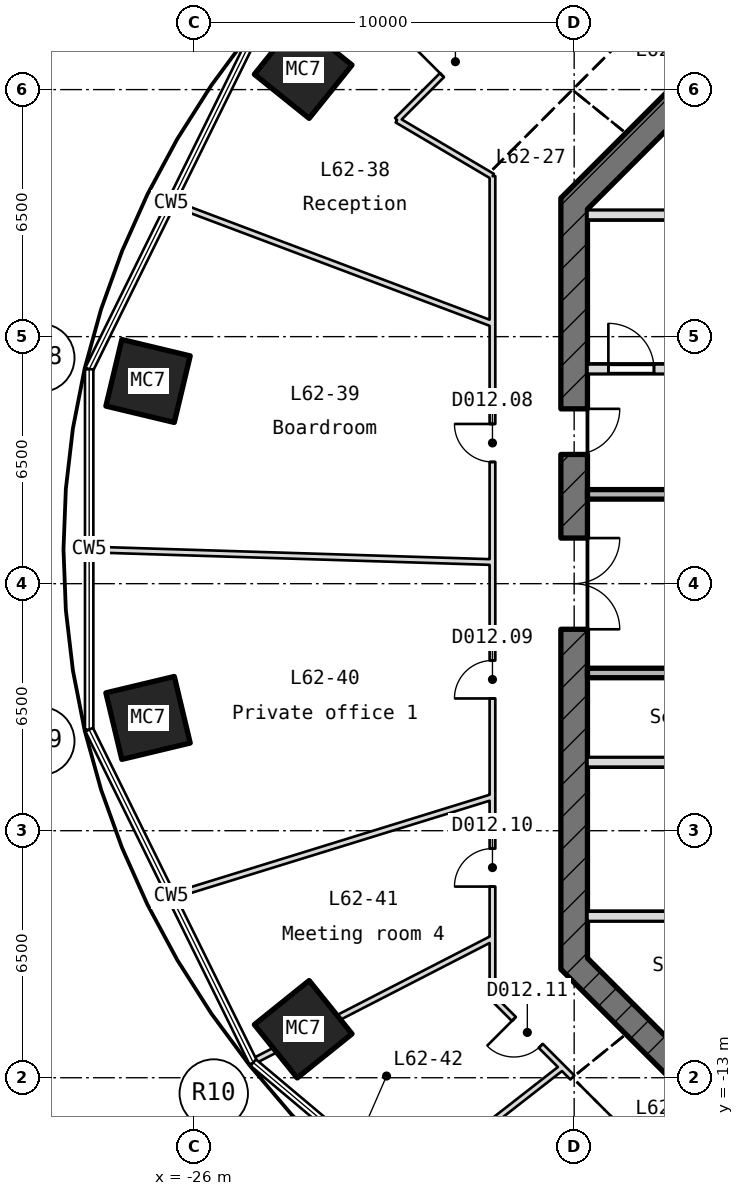
"""IFC4 building model, lengths in metres.
Left out: names, types, materials, properties, quantities, classifications, styles, units other than length and angle.
Written with IfcOpenShell. Run it as: python <this file> out.ifc"""

import sys

from ifc_helpers import new_model, si_unit, direction, frame, frame_2d, origin, origin_2d, place, context, subcontext, project, spatial, rectangle, hollow_rectangle, extrude, element, fill, save


model = new_model("IFC4")
c1 = context("Model", 3, precision=1e-05, world=origin(), true_north=direction((0.0, 1.0)))
c2 = subcontext(c1, "Body", "Model", "MODEL_VIEW")
j1 = project(units=[si_unit("LENGTHUNIT", "METRE"), si_unit("PLANEANGLEUNIT", "RADIAN")], contexts=[c1])
p1 = place(None, origin())
s1 = spatial("IfcSite", under=j1, at=p1, CompositionType="ELEMENT")
p2 = place(p1, origin())
s2 = spatial("IfcBuilding", under=s1, at=p2, CompositionType="ELEMENT")
p3 = place(p2, frame((0.0, 0.0, 279.1)))
s3 = spatial("IfcBuildingStorey", under=s2, at=p3, CompositionType="ELEMENT", Elevation=279.1)
for number, where, z_axis, x_axis in (
    (1, (-23.131, 13.524, -0.25), (0.0, 0.0, 1.0), (0.627, 0.779, 0.0)),
    (2, (-27.213, 5.333, -0.25), (0.0, 0.0, 1.0), (0.233, 0.973, 0.0)),
    (3, (-27.213, -3.533, -0.25), (0.0, 0.0, 1.0), (-0.233, 0.973, 0.0)),
    (4, (-23.131, -11.724, -0.25), (0.0, 0.0, 1.0), (-0.627, 0.779, 0.0)),
):
    element("IfcColumn", number, at=place(p3, frame(where, z_axis=z_axis, x_axis=x_axis)), inside=s3, PredefinedType="COLUMN", context=c2, shape_type="SweptSolid", body=[
        extrude(hollow_rectangle(XDim=1.8, YDim=1.85, WallThickness=0.06, at=origin_2d()), origin(), (0.0, 0.0, 1.0), 5.47),
    ])
p4 = place(p3, frame((-12.897, 13.103, -0.25), z_axis=(0.0, 0.0, 1.0), x_axis=(-0.707106781187, -0.707106781187, 0.0)))
e5 = element("IfcWall", 5, at=p4, inside=s3, PredefinedType="SHEAR", context=c2, shape_type="SweptSolid", body=[
    extrude(rectangle(XDim=4.533, YDim=0.7, at=frame_2d((2.266, 0.0))), origin(), (0.0, 0.0, 1.0), 5.47),
])
p5 = place(p3, frame((-16.0, 10.145, -0.25), z_axis=(0.0, 0.0, 1.0), x_axis=(0.0, -1.0, 0.0)))
e6 = element("IfcWall", 6, at=p5, inside=s3, PredefinedType="SHEAR", context=c2, shape_type="SweptSolid", body=[
    extrude(rectangle(XDim=20.29, YDim=0.7, at=frame_2d((10.145, 0.0))), origin(), (0.0, 0.0, 1.0), 5.47),
])
p6 = place(p5, frame((8.945, 0.0, 0.25)))
e7 = element("IfcOpeningElement", 7, at=p6, cuts=e6, PredefinedType="OPENING", context=c2, shape_type="SweptSolid", body=[
    extrude(rectangle(XDim=2.4, YDim=2.1, at=frame_2d((1.2, 1.05))), frame((0.0, 0.36, 0.0), z_axis=(0.0, -1.0, 0.0), x_axis=(1.0, 0.0, 0.0)), (0.0, 0.0, 1.0), 0.72),
])
p7 = place(p5, frame((5.545, 0.0, 0.25)))
e8 = element("IfcOpeningElement", 8, at=p7, cuts=e6, PredefinedType="OPENING", context=c2, shape_type="SweptSolid", body=[
    extrude(rectangle(XDim=1.2, YDim=2.1, at=frame_2d((0.6, 1.05))), frame((0.0, 0.36, 0.0), z_axis=(0.0, -1.0, 0.0), x_axis=(1.0, 0.0, 0.0)), (0.0, 0.0, 1.0), 0.72),
])
p8 = place(p3, frame((-16.103, -9.897, -0.25), z_axis=(0.0, 0.0, 1.0), x_axis=(0.707106781187, -0.707106781187, 0.0)))
e9 = element("IfcWall", 9, at=p8, inside=s3, PredefinedType="SHEAR", context=c2, shape_type="SweptSolid", body=[
    extrude(rectangle(XDim=4.533, YDim=0.7, at=frame_2d((2.266, 0.0))), origin(), (0.0, 0.0, 1.0), 5.47),
])
p9 = place(p3, frame((-15.65, -8.75, -0.25), z_axis=(0.0, 0.0, 1.0), x_axis=(1.0, 0.0, 0.0)))
e10 = element("IfcWall", 10, at=p9, inside=s3, PredefinedType="SHEAR", context=c2, shape_type="SweptSolid", body=[
    extrude(rectangle(XDim=7.1, YDim=0.25, at=frame_2d((3.55, 0.0))), origin(), (0.0, 0.0, 1.0), 5.47),
])
p10 = place(p9, frame((5.6, 0.0, 0.25)))
e11 = element("IfcOpeningElement", 11, at=p10, cuts=e10, PredefinedType="OPENING", context=c2, shape_type="SweptSolid", body=[
    extrude(rectangle(XDim=1.2, YDim=2.1, at=frame_2d((0.6, 1.05))), frame((0.0, 0.135, 0.0), z_axis=(0.0, -1.0, 0.0), x_axis=(1.0, 0.0, 0.0)), (0.0, 0.0, 1.0), 0.27),
])
p11 = place(p3, frame((-15.65, -4.7, -0.25), z_axis=(0.0, 0.0, 1.0), x_axis=(1.0, 0.0, 0.0)))
e12 = element("IfcWall", 12, at=p11, inside=s3, PredefinedType="SHEAR", context=c2, shape_type="SweptSolid", body=[
    extrude(rectangle(XDim=7.1, YDim=0.25, at=frame_2d((3.55, 0.0))), origin(), (0.0, 0.0, 1.0), 5.47),
])
for number, where, z_axis, x_axis in (
    (13, (-15.65, -2.35, 0.0), (0.0, 0.0, 1.0), (1.0, 0.0, 0.0)),
    (14, (-15.65, 2.35, 0.0), (0.0, 0.0, 1.0), (1.0, 0.0, 0.0)),
):
    element("IfcWall", number, at=place(p3, frame(where, z_axis=z_axis, x_axis=x_axis)), inside=s3, PredefinedType="STANDARD", context=c2, shape_type="SweptSolid", body=[
        extrude(rectangle(XDim=7.25, YDim=0.25, at=frame_2d((3.625, 0.0))), origin(), (0.0, 0.0, 1.0), 5.22),
    ])
p12 = place(p3, frame((-15.65, 5.65, -0.25), z_axis=(0.0, 0.0, 1.0), x_axis=(1.0, 0.0, 0.0)))
e15 = element("IfcWall", 15, at=p12, inside=s3, PredefinedType="SHEAR", context=c2, shape_type="SweptSolid", body=[
    extrude(rectangle(XDim=7.1, YDim=0.25, at=frame_2d((3.55, 0.0))), origin(), (0.0, 0.0, 1.0), 5.47),
])
p13 = place(p12, frame((0.55, 0.0, 0.25)))
e16 = element("IfcOpeningElement", 16, at=p13, cuts=e15, PredefinedType="OPENING", context=c2, shape_type="SweptSolid", body=[
    extrude(rectangle(XDim=1.2, YDim=2.1, at=frame_2d((0.6, 1.05))), frame((0.0, 0.135, 0.0), z_axis=(0.0, -1.0, 0.0), x_axis=(1.0, 0.0, 0.0)), (0.0, 0.0, 1.0), 0.27),
])
p14 = place(p3, frame((-15.65, 9.7, -0.25), z_axis=(0.0, 0.0, 1.0), x_axis=(1.0, 0.0, 0.0)))
e17 = element("IfcWall", 17, at=p14, inside=s3, PredefinedType="SHEAR", context=c2, shape_type="SweptSolid", body=[
    extrude(rectangle(XDim=7.1, YDim=0.25, at=frame_2d((3.55, 0.0))), origin(), (0.0, 0.0, 1.0), 5.47),
])
p15 = place(p3, frame((-26.584, -8.216, 0.0), z_axis=(0.0, 0.0, 1.0), x_axis=(0.955409308592, 0.29528469831, 0.0)))
e18 = element("IfcWall", 18, at=p15, inside=s3, PredefinedType="PARTITIONING", context=c2, shape_type="SweptSolid", body=[
    extrude(rectangle(XDim=8.828, YDim=0.15, at=frame_2d((4.414, 0.0))), origin(), (0.0, 0.0, 1.0), 5.22),
])
p16 = place(p3, frame((-24.44, -12.566, 0.0), z_axis=(0.0, 0.0, 1.0), x_axis=(0.889344754937, 0.45723725446, 0.0)))
e19 = element("IfcWall", 19, at=p16, inside=s3, PredefinedType="PARTITIONING", context=c2, shape_type="SweptSolid", body=[
    extrude(rectangle(XDim=7.073, YDim=0.15, at=frame_2d((3.536, 0.0))), origin(), (0.0, 0.0, 1.0), 5.22),
])
p17 = place(p3, frame((-18.46, -14.399, 0.0), z_axis=(0.0, 0.0, 1.0), x_axis=(0.788462265821, 0.615083128834, 0.0)))
e20 = element("IfcWall", 20, at=p17, inside=s3, PredefinedType="PARTITIONING", context=c2, shape_type="SweptSolid", body=[
    extrude(rectangle(XDim=2.72, YDim=0.15, at=frame_2d((1.36, 0.0))), origin(), (0.0, 0.0, 1.0), 5.22),
])
p18 = place(p3, frame((-20.659, 12.2, 0.0), z_axis=(0.0, 0.0, 1.0), x_axis=(0.707091504448, 0.707122057596, 0.0)))
e21 = element("IfcWall", 21, at=p18, inside=s3, PredefinedType="PARTITIONING", context=c2, shape_type="SweptSolid", body=[
    extrude(rectangle(XDim=7.991, YDim=0.15, at=frame_2d((3.995, 0.0))), origin(), (0.0, 0.0, 1.0), 5.22),
])
p19 = place(p18, frame((1.67, 0.0, 0.0)))
e22 = element("IfcOpeningElement", 22, at=p19, cuts=e21, PredefinedType="OPENING", context=c2, shape_type="SweptSolid", body=[
    extrude(rectangle(XDim=1.0, YDim=2.1, at=frame_2d((0.5, 1.05))), frame((0.0, 0.085, 0.0), z_axis=(0.0, -1.0, 0.0), x_axis=(1.0, 0.0, 0.0)), (0.0, 0.0, 1.0), 0.17),
])
p20 = place(p3, frame((-18.15, -10.891, 0.0), z_axis=(0.0, 0.0, 1.0), x_axis=(0.0, 1.0, 0.0)))
e23 = element("IfcWall", 23, at=p20, inside=s3, PredefinedType="PARTITIONING", context=c2, shape_type="SweptSolid", body=[
    extrude(rectangle(XDim=21.614, YDim=0.15, at=frame_2d((10.807, 0.0))), origin(), (0.0, 0.0, 1.0), 5.22),
])
p21 = place(p20, frame((14.093, 0.0, 0.0)))
e24 = element("IfcOpeningElement", 24, at=p21, cuts=e23, PredefinedType="OPENING", context=c2, shape_type="SweptSolid", body=[
    extrude(rectangle(XDim=1.0, YDim=2.1, at=frame_2d((0.5, 1.05))), frame((0.0, 0.085, 0.0), z_axis=(0.0, -1.0, 0.0), x_axis=(1.0, 0.0, 0.0)), (0.0, 0.0, 1.0), 0.17),
])
p22 = place(p20, frame((7.87, 0.0, 0.0)))
e25 = element("IfcOpeningElement", 25, at=p22, cuts=e23, PredefinedType="OPENING", context=c2, shape_type="SweptSolid", body=[
    extrude(rectangle(XDim=1.0, YDim=2.1, at=frame_2d((0.5, 1.05))), frame((0.0, 0.085, 0.0), z_axis=(0.0, -1.0, 0.0), x_axis=(1.0, 0.0, 0.0)), (0.0, 0.0, 1.0), 0.17),
])
p23 = place(p20, frame((2.92, 0.0, 0.0)))
e26 = element("IfcOpeningElement", 26, at=p23, cuts=e23, PredefinedType="OPENING", context=c2, shape_type="SweptSolid", body=[
    extrude(rectangle(XDim=1.0, YDim=2.1, at=frame_2d((0.5, 1.05))), frame((0.0, 0.085, 0.0), z_axis=(0.0, -1.0, 0.0), x_axis=(1.0, 0.0, 0.0)), (0.0, 0.0, 1.0), 0.17),
])
p24 = place(p3, frame((-16.046, -12.994, 0.0), z_axis=(0.0, 0.0, 1.0), x_axis=(-0.707106781187, 0.707106781187, 0.0)))
e27 = element("IfcWall", 27, at=p24, inside=s3, PredefinedType="PARTITIONING", context=c2, shape_type="SweptSolid", body=[
    extrude(rectangle(XDim=2.975, YDim=0.15, at=frame_2d((1.487, 0.0))), origin(), (0.0, 0.0, 1.0), 5.22),
])
p25 = place(p24, frame((1.177, 0.0, 0.0)))
e28 = element("IfcOpeningElement", 28, at=p25, cuts=e27, PredefinedType="OPENING", context=c2, shape_type="SweptSolid", body=[
    extrude(rectangle(XDim=1.0, YDim=2.1, at=frame_2d((0.5, 1.05))), frame((0.0, 0.085, 0.0), z_axis=(0.0, -1.0, 0.0), x_axis=(1.0, 0.0, 0.0)), (0.0, 0.0, 1.0), 0.17),
])
p26 = place(p3, frame((-18.15, 10.718, 0.0), z_axis=(0.0, 0.0, 1.0), x_axis=(-0.861086603375, 0.508458318339, 0.0)))
e29 = element("IfcWall", 29, at=p26, inside=s3, PredefinedType="PARTITIONING", context=c2, shape_type="SweptSolid", body=[
    extrude(rectangle(XDim=2.914, YDim=0.15, at=frame_2d((1.457, 0.0))), origin(), (0.0, 0.0, 1.0), 5.22),
])
p27 = place(p3, frame((-18.15, 6.837, 0.0), z_axis=(0.0, 0.0, 1.0), x_axis=(-0.935798247138, 0.352536013271, 0.0)))
e30 = element("IfcWall", 30, at=p27, inside=s3, PredefinedType="PARTITIONING", context=c2, shape_type="SweptSolid", body=[
    extrude(rectangle(XDim=9.013, YDim=0.15, at=frame_2d((4.507, 0.0))), origin(), (0.0, 0.0, 1.0), 5.22),
])
p28 = place(p3, frame((-18.15, 0.568, 0.0), z_axis=(0.0, 0.0, 1.0), x_axis=(-0.999510501518, 0.031285097982, 0.0)))
e31 = element("IfcWall", 31, at=p28, inside=s3, PredefinedType="PARTITIONING", context=c2, shape_type="SweptSolid", body=[
    extrude(rectangle(XDim=10.597, YDim=0.15, at=frame_2d((5.299, 0.0))), origin(), (0.0, 0.0, 1.0), 5.22),
])
p29 = place(p13, origin())
e32 = element("IfcDoor", 32, at=p29, inside=s3, OperationType="SINGLE_SWING_RIGHT", PredefinedType="DOOR", context=c2, shape_type="SweptSolid", body=[
    extrude(rectangle(XDim=1.2, YDim=2.1, at=frame_2d((0.6, 1.05))), frame((0.0, 0.025, 0.0), z_axis=(0.0, -1.0, 0.0), x_axis=(1.0, 0.0, 0.0)), (0.0, 0.0, 1.0), 0.05),
])
fill(e16, e32)
p30 = place(p6, origin())
e33 = element("IfcDoor", 33, at=p30, inside=s3, OperationType="DOUBLE_DOOR_SINGLE_SWING", PredefinedType="DOOR", context=c2, shape_type="SweptSolid", body=[
    extrude(rectangle(XDim=2.4, YDim=2.1, at=frame_2d((1.2, 1.05))), frame((0.0, 0.025, 0.0), z_axis=(0.0, -1.0, 0.0), x_axis=(1.0, 0.0, 0.0)), (0.0, 0.0, 1.0), 0.05),
])
fill(e7, e33)
p31 = place(p7, origin())
e34 = element("IfcDoor", 34, at=p31, inside=s3, OperationType="SINGLE_SWING_RIGHT", PredefinedType="DOOR", context=c2, shape_type="SweptSolid", body=[
    extrude(rectangle(XDim=1.2, YDim=2.1, at=frame_2d((0.6, 1.05))), frame((0.0, 0.025, 0.0), z_axis=(0.0, -1.0, 0.0), x_axis=(1.0, 0.0, 0.0)), (0.0, 0.0, 1.0), 0.05),
])
fill(e8, e34)
p32 = place(p19, origin())
e35 = element("IfcDoor", 35, at=p32, inside=s3, OperationType="SINGLE_SWING_RIGHT", PredefinedType="DOOR", context=c2, shape_type="SweptSolid", body=[
    extrude(rectangle(XDim=1.0, YDim=2.1, at=frame_2d((0.5, 1.05))), frame((0.0, 0.025, 0.0), z_axis=(0.0, -1.0, 0.0), x_axis=(1.0, 0.0, 0.0)), (0.0, 0.0, 1.0), 0.05),
])
fill(e22, e35)
p33 = place(p21, origin())
e36 = element("IfcDoor", 36, at=p33, inside=s3, OperationType="SINGLE_SWING_RIGHT", PredefinedType="DOOR", context=c2, shape_type="SweptSolid", body=[
    extrude(rectangle(XDim=1.0, YDim=2.1, at=frame_2d((0.5, 1.05))), frame((0.0, 0.025, 0.0), z_axis=(0.0, -1.0, 0.0), x_axis=(1.0, 0.0, 0.0)), (0.0, 0.0, 1.0), 0.05),
])
fill(e24, e36)
p34 = place(p22, origin())
e37 = element("IfcDoor", 37, at=p34, inside=s3, OperationType="SINGLE_SWING_RIGHT", PredefinedType="DOOR", context=c2, shape_type="SweptSolid", body=[
    extrude(rectangle(XDim=1.0, YDim=2.1, at=frame_2d((0.5, 1.05))), frame((0.0, 0.025, 0.0), z_axis=(0.0, -1.0, 0.0), x_axis=(1.0, 0.0, 0.0)), (0.0, 0.0, 1.0), 0.05),
])
fill(e25, e37)
p35 = place(p23, origin())
e38 = element("IfcDoor", 38, at=p35, inside=s3, OperationType="SINGLE_SWING_RIGHT", PredefinedType="DOOR", context=c2, shape_type="SweptSolid", body=[
    extrude(rectangle(XDim=1.0, YDim=2.1, at=frame_2d((0.5, 1.05))), frame((0.0, 0.025, 0.0), z_axis=(0.0, -1.0, 0.0), x_axis=(1.0, 0.0, 0.0)), (0.0, 0.0, 1.0), 0.05),
])
fill(e26, e38)
p36 = place(p25, origin())
e39 = element("IfcDoor", 39, at=p36, inside=s3, OperationType="SINGLE_SWING_RIGHT", PredefinedType="DOOR", context=c2, shape_type="SweptSolid", body=[
    extrude(rectangle(XDim=1.0, YDim=2.1, at=frame_2d((0.5, 1.05))), frame((0.0, 0.025, 0.0), z_axis=(0.0, -1.0, 0.0), x_axis=(1.0, 0.0, 0.0)), (0.0, 0.0, 1.0), 0.05),
])
fill(e28, e39)
save(model, sys.argv[1])
